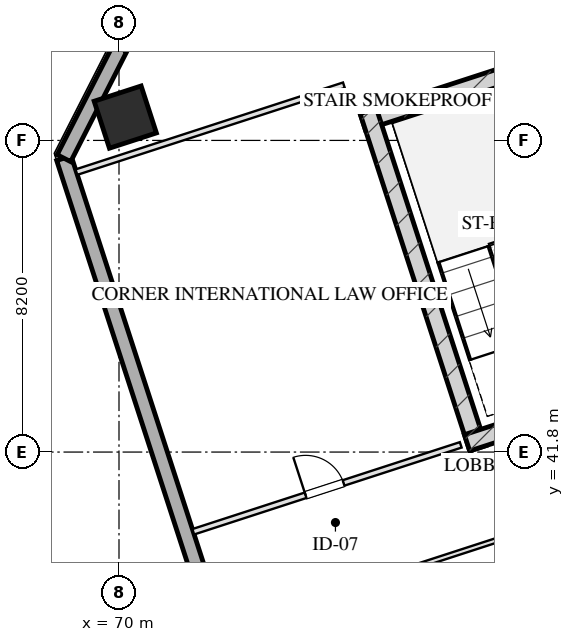
"""IFC4 building model, lengths in metres.
Left out: names, types, materials, properties, quantities, classifications, styles, units other than length and angle.
Written with IfcOpenShell. Run it as: python <this file> out.ifc"""

import sys

from ifc_helpers import new_model, si_unit, direction, frame, frame_2d, origin, origin_2d, place, context, subcontext, project, spatial, rectangle, hollow_rectangle, extrude, element, fill, save


model = new_model("IFC4")
c1 = context("Model", 3, precision=1e-05, world=origin(), true_north=direction((0.0, 1.0)))
c2 = subcontext(c1, "Body", "Model", "MODEL_VIEW")
j1 = project(units=[si_unit("LENGTHUNIT", "METRE"), si_unit("PLANEANGLEUNIT", "RADIAN")], contexts=[c1])
p1 = place(None, origin())
s1 = spatial("IfcSite", under=j1, at=p1, CompositionType="ELEMENT")
p2 = place(p1, origin())
s2 = spatial("IfcBuilding", under=s1, at=p2, CompositionType="ELEMENT")
p3 = place(p2, frame((0.0, 0.0, 188.6)))
s3 = spatial("IfcBuildingStorey", under=s2, at=p3, CompositionType="ELEMENT", Elevation=188.6)
p4 = place(p3, frame((76.415, 50.489, 0.0), z_axis=(0.0, 0.0, 1.0), x_axis=(0.951056810414, 0.309016089169, 0.0)))
e1 = element("IfcWall", 1, at=p4, inside=s3, PredefinedType="SHEAR", context=c2, shape_type="SweptSolid", body=[
    extrude(rectangle(XDim=16.25, YDim=0.45, at=frame_2d((8.125, 0.0))), origin(), (0.0, 0.0, 1.0), 3.45),
])
p5 = place(p3, frame((79.442, 41.899, 0.0), z_axis=(0.0, 0.0, 1.0), x_axis=(-0.309035778627, 0.951050412717, 0.0)))
e2 = element("IfcWall", 2, at=p5, inside=s3, PredefinedType="SHEAR", context=c2, shape_type="SweptSolid", body=[
    extrude(rectangle(XDim=9.33, YDim=0.45, at=frame_2d((4.665, 0.0))), origin(), (0.0, 0.0, 1.0), 3.45),
])
p6 = place(p3, frame((79.159, 42.043, 0.0), z_axis=(0.0, 0.0, 1.0), x_axis=(0.951047485828, 0.309044785913, 0.0)))
e3 = element("IfcWall", 3, at=p6, inside=s3, PredefinedType="SHEAR", context=c2, shape_type="SweptSolid", body=[
    extrude(rectangle(XDim=4.145, YDim=0.45, at=frame_2d((2.073, 0.0))), origin(), (0.0, 0.0, 1.0), 3.45),
])
p7 = place(p3, frame((70.165, 50.614, 0.0), z_axis=(0.0, 0.0, 1.0), x_axis=(0.951056516295, 0.309016994375, 0.0)))
e4 = element("IfcColumn", 4, at=p7, inside=s3, PredefinedType="COLUMN", context=c2, shape_type="SweptSolid", body=[
    extrude(hollow_rectangle(XDim=1.3, YDim=1.3, WallThickness=0.045, at=origin_2d()), origin(), (0.0, 0.0, 1.0), 3.451),
])
p8 = place(p3, frame((81.776, 8.827, 0.0), z_axis=(0.0, 0.0, 1.0), x_axis=(-0.309014228706, 0.951057414911, 0.0)))
e5 = element("IfcWall", 5, at=p8, inside=s3, PredefinedType="SOLIDWALL", context=c2, shape_type="SweptSolid", body=[
    extrude(rectangle(XDim=42.8, YDim=0.4, at=frame_2d((21.4, 0.0))), origin(), (0.0, 0.0, 1.0), 2.61),
])
p9 = place(p8, frame((22.95, 0.0, 0.75)))
e6 = element("IfcOpeningElement", 6, at=p9, cuts=e5, PredefinedType="OPENING", context=c2, shape_type="SweptSolid", body=[
    extrude(rectangle(XDim=2.1, YDim=1.46, at=frame_2d((1.05, 0.73))), frame((0.0, 0.21, 0.0), z_axis=(0.0, -1.0, 0.0), x_axis=(1.0, 0.0, 0.0)), (0.0, 0.0, 1.0), 0.42),
])
p10 = place(p8, frame((26.75, 0.0, 0.75)))
e7 = element("IfcOpeningElement", 7, at=p10, cuts=e5, PredefinedType="OPENING", context=c2, shape_type="SweptSolid", body=[
    extrude(rectangle(XDim=2.1, YDim=1.46, at=frame_2d((1.05, 0.73))), frame((0.0, 0.21, 0.0), z_axis=(0.0, -1.0, 0.0), x_axis=(1.0, 0.0, 0.0)), (0.0, 0.0, 1.0), 0.42),
])
p11 = place(p8, frame((17.787, 0.0, 0.0)))
e8 = element("IfcOpeningElement", 8, at=p11, cuts=e5, PredefinedType="OPENING", context=c2, shape_type="SweptSolid", body=[
    extrude(rectangle(XDim=1.1, YDim=2.15, at=frame_2d((0.55, 1.075))), frame((0.0, 0.21, 0.0), z_axis=(0.0, -1.0, 0.0), x_axis=(1.0, 0.0, 0.0)), (0.0, 0.0, 1.0), 0.42),
])
p12 = place(p3, frame((68.551, 49.532, 0.0), z_axis=(0.0, 0.0, 1.0), x_axis=(0.454019523198, 0.890991735402, 0.0)))
e9 = element("IfcWall", 9, at=p12, inside=s3, PredefinedType="SOLIDWALL", context=c2, shape_type="SweptSolid", body=[
    extrude(rectangle(XDim=3.394, YDim=0.4, at=frame_2d((1.697, 0.0))), origin(), (0.0, 0.0, 1.0), 2.61),
])
p13 = place(p3, frame((68.88, 49.166, 0.0), z_axis=(0.0, 0.0, 1.0), x_axis=(0.951060977215, 0.309003264738, 0.0)))
e10 = element("IfcWall", 10, at=p13, inside=s3, PredefinedType="PARTITIONING", context=c2, shape_type="SweptSolid", body=[
    extrude(rectangle(XDim=7.4, YDim=0.15, at=frame_2d((3.7, 0.0))), origin(), (0.0, 0.0, 1.0), 3.175),
])
p14 = place(p3, frame((71.955, 39.703, 0.0), z_axis=(0.0, 0.0, 1.0), x_axis=(0.951060977215, 0.309003264738, 0.0)))
e11 = element("IfcWall", 11, at=p14, inside=s3, PredefinedType="PARTITIONING", context=c2, shape_type="SweptSolid", body=[
    extrude(rectangle(XDim=7.4, YDim=0.15, at=frame_2d((3.7, 0.0))), origin(), (0.0, 0.0, 1.0), 3.175),
])
p15 = place(p14, frame((3.108, 0.0, 0.0)))
e12 = element("IfcOpeningElement", 12, at=p15, cuts=e11, PredefinedType="OPENING", context=c2, shape_type="SweptSolid", body=[
    extrude(rectangle(XDim=1.05, YDim=2.05, at=frame_2d((0.525, 1.025))), frame((0.0, 0.085, 0.0), z_axis=(0.0, -1.0, 0.0), x_axis=(1.0, 0.0, 0.0)), (0.0, 0.0, 1.0), 0.17),
])
p16 = place(p3, frame((72.783, 37.154, 0.0), z_axis=(0.0, 0.0, 1.0), x_axis=(0.951053980838, 0.309024797601, 0.0)))
e13 = element("IfcWall", 13, at=p16, inside=s3, PredefinedType="PARTITIONING", context=c2, shape_type="SweptSolid", body=[
    extrude(rectangle(XDim=9.55, YDim=0.12, at=frame_2d((4.775, 0.0))), origin(), (0.0, 0.0, 1.0), 3.175),
])
p17 = place(p15, origin())
e14 = element("IfcDoor", 14, at=p17, inside=s3, OperationType="SINGLE_SWING_LEFT", PredefinedType="DOOR", context=c2, shape_type="SweptSolid", body=[
    extrude(rectangle(XDim=1.05, YDim=2.05, at=frame_2d((0.525, 1.025))), frame((0.0, 0.025, 0.0), z_axis=(0.0, -1.0, 0.0), x_axis=(1.0, 0.0, 0.0)), (0.0, 0.0, 1.0), 0.05),
])
fill(e12, e14)
save(model, sys.argv[1])
